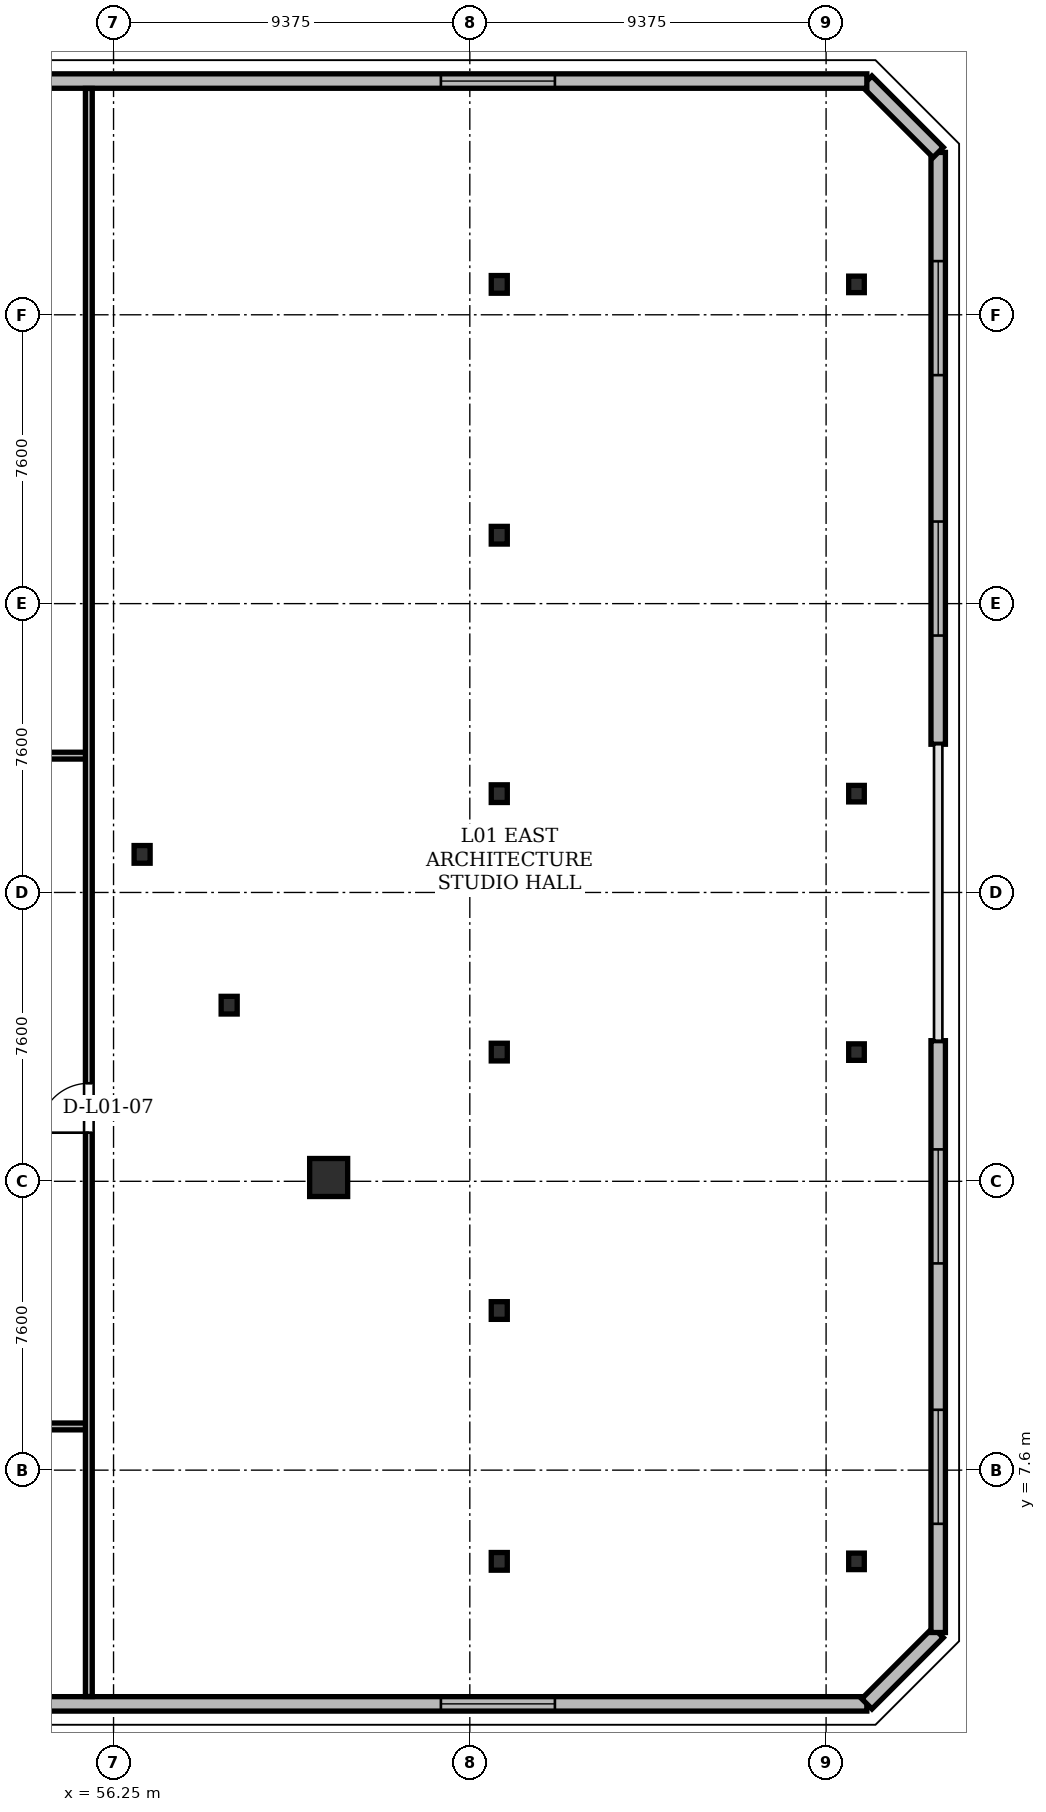
"""IFC4 building model, lengths in metres.
Left out: names, types, materials, properties, quantities, classifications, styles, units other than length and angle.
Written with IfcOpenShell. Run it as: python <this file> out.ifc"""

import sys

from ifc_helpers import new_model, si_unit, direction, frame, frame_2d, origin, origin_2d, place, context, subcontext, project, spatial, rectangle, hollow_rectangle, i_section, extrude, element, fill, save


model = new_model("IFC4")
c1 = context("Model", 3, precision=1e-05, world=origin(), true_north=direction((0.0, 1.0)))
c2 = subcontext(c1, "Body", "Model", "MODEL_VIEW")
j1 = project(units=[si_unit("LENGTHUNIT", "METRE"), si_unit("PLANEANGLEUNIT", "RADIAN")], contexts=[c1])
p1 = place(None, origin())
s1 = spatial("IfcSite", under=j1, at=p1, CompositionType="ELEMENT")
p2 = place(p1, origin())
s2 = spatial("IfcBuilding", under=s1, at=p2, CompositionType="ELEMENT")
p3 = place(p2, frame((0.0, 0.0, 5.4)))
s3 = spatial("IfcBuildingStorey", under=s2, at=p3, CompositionType="ELEMENT", Elevation=5.4)
p4 = place(p3, frame((61.91, 15.3, 0.005), z_axis=(0.0, 0.0, 1.0), x_axis=(1.0, 0.0, 0.0)))
e1 = element("IfcColumn", 1, at=p4, inside=s3, PredefinedType="COLUMN", context=c2, shape_type="SweptSolid", body=[
    extrude(hollow_rectangle(XDim=1.0, YDim=1.0, WallThickness=0.085, at=origin_2d()), origin(), (0.0, 0.0, 1.0), 4.491),
])
for number, where, z_axis, x_axis in (
    (2, (59.292, 19.834, 0.005), (0.0, 0.0, 1.0), (1.0, 0.0, 0.0)),
    (3, (57.002, 23.802, 0.005), (0.0, 0.0, 1.0), (1.0, 0.0, 0.0)),
):
    element("IfcColumn", number, at=place(p3, frame(where, z_axis=z_axis, x_axis=x_axis)), inside=s3, PredefinedType="COLUMN", context=c2, shape_type="SweptSolid", body=[
        extrude(i_section(OverallWidth=0.422, OverallDepth=0.465, WebThickness=0.045, FlangeThickness=0.072, at=origin_2d()), origin(), (0.0, 0.0, 1.0), 4.491),
    ])
for number, where, z_axis, x_axis in (
    (4, (66.4, 5.2, 0.0), (0.0, 0.0, 1.0), (1.0, 0.0, 0.0)),
    (5, (66.4, 11.8, 0.0), (0.0, 0.0, 1.0), (1.0, 0.0, 0.0)),
    (6, (66.4, 18.6, 0.0), (0.0, 0.0, 1.0), (1.0, 0.0, 0.0)),
    (7, (66.4, 25.4, 0.0), (0.0, 0.0, 1.0), (1.0, 0.0, 0.0)),
    (8, (66.4, 32.2, 0.0), (0.0, 0.0, 1.0), (1.0, 0.0, 0.0)),
    (9, (66.4, 38.8, 0.0), (0.0, 0.0, 1.0), (1.0, 0.0, 0.0)),
):
    element("IfcColumn", number, at=place(p3, frame(where, z_axis=z_axis, x_axis=x_axis)), inside=s3, PredefinedType="COLUMN", context=c2, shape_type="SweptSolid", body=[
        extrude(i_section(OverallWidth=0.422, OverallDepth=0.465, WebThickness=0.045, FlangeThickness=0.072, at=origin_2d()), origin(), (0.0, 0.0, 1.0), 4.5),
    ])
for number, where, z_axis, x_axis in (
    (10, (75.8, 5.2, 0.0), (0.0, 0.0, 1.0), (1.0, 0.0, 0.0)),
    (11, (75.8, 18.6, 0.0), (0.0, 0.0, 1.0), (1.0, 0.0, 0.0)),
    (12, (75.8, 25.4, 0.0), (0.0, 0.0, 1.0), (1.0, 0.0, 0.0)),
    (13, (75.8, 38.8, 0.0), (0.0, 0.0, 1.0), (1.0, 0.0, 0.0)),
):
    element("IfcColumn", number, at=place(p3, frame(where, z_axis=z_axis, x_axis=x_axis)), inside=s3, PredefinedType="COLUMN", context=c2, shape_type="SweptSolid", body=[
        extrude(i_section(OverallWidth=0.411, OverallDepth=0.434, WebThickness=0.036, FlangeThickness=0.057, at=origin_2d()), origin(), (0.0, 0.0, 1.0), 4.5),
    ])
p5 = place(p3, frame((41.4, 1.45, 0.0), z_axis=(0.0, 0.0, 1.0), x_axis=(1.0, 0.0, 0.0)))
e14 = element("IfcWall", 14, at=p5, inside=s3, PredefinedType="SOLIDWALL", context=c2, shape_type="SweptSolid", body=[
    extrude(rectangle(XDim=34.672, YDim=0.38, at=frame_2d((17.336, 0.0))), origin(), (0.0, 0.0, 1.0), 3.283),
])
p6 = place(p5, frame((8.208, 0.0, 0.85)))
e15 = element("IfcOpeningElement", 15, at=p6, cuts=e14, PredefinedType="OPENING", context=c2, shape_type="SweptSolid", body=[
    extrude(rectangle(XDim=3.0, YDim=2.25, at=frame_2d((1.5, 1.125))), frame((0.0, 0.19, 0.0), z_axis=(0.0, -1.0, 0.0), x_axis=(1.0, 0.0, 0.0)), (0.0, 0.0, 1.0), 0.38),
])
p7 = place(p5, frame((23.464, 0.0, 0.85)))
e16 = element("IfcOpeningElement", 16, at=p7, cuts=e14, PredefinedType="OPENING", context=c2, shape_type="SweptSolid", body=[
    extrude(rectangle(XDim=3.0, YDim=2.25, at=frame_2d((1.5, 1.125))), frame((0.0, 0.19, 0.0), z_axis=(0.0, -1.0, 0.0), x_axis=(1.0, 0.0, 0.0)), (0.0, 0.0, 1.0), 0.38),
])
p8 = place(p3, frame((76.072, 1.45, 0.0), z_axis=(0.0, 0.0, 1.0), x_axis=(0.707060812925, 0.70715274646, 0.0)))
e17 = element("IfcWall", 17, at=p8, inside=s3, PredefinedType="SOLIDWALL", context=c2, shape_type="SweptSolid", body=[
    extrude(rectangle(XDim=2.656, YDim=0.38, at=frame_2d((1.328, 0.0))), origin(), (0.0, 0.0, 1.0), 4.22),
])
p9 = place(p3, frame((77.95, 3.328, 0.0), z_axis=(0.0, 0.0, 1.0), x_axis=(0.0, 1.0, 0.0)))
e18 = element("IfcWall", 18, at=p9, inside=s3, PredefinedType="SOLIDWALL", context=c2, shape_type="SweptSolid", body=[
    extrude(rectangle(XDim=15.572, YDim=0.38, at=frame_2d((7.786, 0.0))), origin(), (0.0, 0.0, 1.0), 4.22),
])
p10 = place(p9, frame((2.86, 0.0, 0.85)))
e19 = element("IfcOpeningElement", 19, at=p10, cuts=e18, PredefinedType="OPENING", context=c2, shape_type="SweptSolid", body=[
    extrude(rectangle(XDim=3.0, YDim=2.25, at=frame_2d((1.5, 1.125))), frame((0.0, 0.19, 0.0), z_axis=(0.0, -1.0, 0.0), x_axis=(1.0, 0.0, 0.0)), (0.0, 0.0, 1.0), 0.38),
])
p11 = place(p9, frame((9.712, 0.0, 0.85)))
e20 = element("IfcOpeningElement", 20, at=p11, cuts=e18, PredefinedType="OPENING", context=c2, shape_type="SweptSolid", body=[
    extrude(rectangle(XDim=3.0, YDim=2.25, at=frame_2d((1.5, 1.125))), frame((0.0, 0.19, 0.0), z_axis=(0.0, -1.0, 0.0), x_axis=(1.0, 0.0, 0.0)), (0.0, 0.0, 1.0), 0.38),
])
p12 = place(p3, frame((77.95, 26.7, 0.0), z_axis=(0.0, 0.0, 1.0), x_axis=(0.0, 1.0, 0.0)))
e21 = element("IfcWall", 21, at=p12, inside=s3, PredefinedType="SOLIDWALL", context=c2, shape_type="SweptSolid", body=[
    extrude(rectangle(XDim=15.572, YDim=0.38, at=frame_2d((7.786, 0.0))), origin(), (0.0, 0.0, 1.0), 4.22),
])
p13 = place(p12, frame((2.86, 0.0, 0.85)))
e22 = element("IfcOpeningElement", 22, at=p13, cuts=e21, PredefinedType="OPENING", context=c2, shape_type="SweptSolid", body=[
    extrude(rectangle(XDim=3.0, YDim=2.25, at=frame_2d((1.5, 1.125))), frame((0.0, 0.19, 0.0), z_axis=(0.0, -1.0, 0.0), x_axis=(1.0, 0.0, 0.0)), (0.0, 0.0, 1.0), 0.38),
])
p14 = place(p12, frame((9.712, 0.0, 0.85)))
e23 = element("IfcOpeningElement", 23, at=p14, cuts=e21, PredefinedType="OPENING", context=c2, shape_type="SweptSolid", body=[
    extrude(rectangle(XDim=3.0, YDim=2.25, at=frame_2d((1.5, 1.125))), frame((0.0, 0.19, 0.0), z_axis=(0.0, -1.0, 0.0), x_axis=(1.0, 0.0, 0.0)), (0.0, 0.0, 1.0), 0.38),
])
p15 = place(p3, frame((77.95, 42.272, 0.0), z_axis=(0.0, 0.0, 1.0), x_axis=(-0.707106781187, 0.707106781187, 0.0)))
e24 = element("IfcWall", 24, at=p15, inside=s3, PredefinedType="SOLIDWALL", context=c2, shape_type="SweptSolid", body=[
    extrude(rectangle(XDim=2.656, YDim=0.38, at=frame_2d((1.328, 0.0))), origin(), (0.0, 0.0, 1.0), 4.22),
])
p16 = place(p3, frame((76.072, 44.15, 0.0), z_axis=(0.0, 0.0, 1.0), x_axis=(-1.0, 0.0, 0.0)))
e25 = element("IfcWall", 25, at=p16, inside=s3, PredefinedType="SOLIDWALL", context=c2, shape_type="SweptSolid", body=[
    extrude(rectangle(XDim=34.672, YDim=0.38, at=frame_2d((17.336, 0.0))), origin(), (0.0, 0.0, 1.0), 4.22),
])
p17 = place(p16, frame((8.208, 0.0, 0.85)))
e26 = element("IfcOpeningElement", 26, at=p17, cuts=e25, PredefinedType="OPENING", context=c2, shape_type="SweptSolid", body=[
    extrude(rectangle(XDim=3.0, YDim=2.25, at=frame_2d((1.5, 1.125))), frame((0.0, 0.19, 0.0), z_axis=(0.0, -1.0, 0.0), x_axis=(1.0, 0.0, 0.0)), (0.0, 0.0, 1.0), 0.38),
])
p18 = place(p16, frame((23.464, 0.0, 0.85)))
e27 = element("IfcOpeningElement", 27, at=p18, cuts=e25, PredefinedType="OPENING", context=c2, shape_type="SweptSolid", body=[
    extrude(rectangle(XDim=3.0, YDim=2.25, at=frame_2d((1.5, 1.125))), frame((0.0, 0.19, 0.0), z_axis=(0.0, -1.0, 0.0), x_axis=(1.0, 0.0, 0.0)), (0.0, 0.0, 1.0), 0.38),
])
p19 = place(p3, frame((14.03, 8.75, 0.0), z_axis=(0.0, 0.0, 1.0), x_axis=(1.0, 0.0, 0.0)))
e28 = element("IfcWall", 28, at=p19, inside=s3, PredefinedType="PARTITIONING", context=c2, shape_type="SweptSolid", body=[
    extrude(rectangle(XDim=41.57, YDim=0.18, at=frame_2d((20.785, 0.0))), origin(), (0.0, 0.0, 1.0), 3.283),
])
p20 = place(p19, frame((11.336, 0.0, 0.0)))
e29 = element("IfcOpeningElement", 29, at=p20, cuts=e28, PredefinedType="OPENING", context=c2, shape_type="SweptSolid", body=[
    extrude(rectangle(XDim=1.3, YDim=2.2, at=frame_2d((0.65, 1.1))), frame((0.0, 0.09, 0.0), z_axis=(0.0, -1.0, 0.0), x_axis=(1.0, 0.0, 0.0)), (0.0, 0.0, 1.0), 0.18),
])
p21 = place(p19, frame((32.094, 0.0, 0.0)))
e30 = element("IfcOpeningElement", 30, at=p21, cuts=e28, PredefinedType="OPENING", context=c2, shape_type="SweptSolid", body=[
    extrude(rectangle(XDim=1.3, YDim=2.2, at=frame_2d((0.65, 1.1))), frame((0.0, 0.09, 0.0), z_axis=(0.0, -1.0, 0.0), x_axis=(1.0, 0.0, 0.0)), (0.0, 0.0, 1.0), 0.18),
])
p22 = place(p3, frame((27.05, 26.4, 0.0), z_axis=(0.0, 0.0, 1.0), x_axis=(1.0, 0.0, 0.0)))
e31 = element("IfcWall", 31, at=p22, inside=s3, PredefinedType="PARTITIONING", context=c2, shape_type="SweptSolid", body=[
    extrude(rectangle(XDim=28.55, YDim=0.18, at=frame_2d((14.275, 0.0))), origin(), (0.0, 0.0, 1.0), 3.283),
])
p23 = place(p22, frame((7.425, 0.0, 0.0)))
e32 = element("IfcOpeningElement", 32, at=p23, cuts=e31, PredefinedType="OPENING", context=c2, shape_type="SweptSolid", body=[
    extrude(rectangle(XDim=1.3, YDim=2.2, at=frame_2d((0.65, 1.1))), frame((0.0, 0.09, 0.0), z_axis=(0.0, -1.0, 0.0), x_axis=(1.0, 0.0, 0.0)), (0.0, 0.0, 1.0), 0.18),
])
p24 = place(p22, frame((18.437, 0.0, 0.0)))
e33 = element("IfcOpeningElement", 33, at=p24, cuts=e31, PredefinedType="OPENING", context=c2, shape_type="SweptSolid", body=[
    extrude(rectangle(XDim=0.88, YDim=2.08, at=frame_2d((0.44, 1.04))), frame((0.0, 0.09, 0.0), z_axis=(0.0, -1.0, 0.0), x_axis=(1.0, 0.0, 0.0)), (0.0, 0.0, 1.0), 0.18),
])
p25 = place(p22, frame((23.736, 0.0, 0.0)))
e34 = element("IfcOpeningElement", 34, at=p25, cuts=e31, PredefinedType="OPENING", context=c2, shape_type="SweptSolid", body=[
    extrude(rectangle(XDim=0.88, YDim=2.08, at=frame_2d((0.44, 1.04))), frame((0.0, 0.09, 0.0), z_axis=(0.0, -1.0, 0.0), x_axis=(1.0, 0.0, 0.0)), (0.0, 0.0, 1.0), 0.18),
])
p26 = place(p3, frame((55.6, 1.644, 0.0), z_axis=(0.0, 0.0, 1.0), x_axis=(0.0, 1.0, 0.0)))
e35 = element("IfcWall", 35, at=p26, inside=s3, PredefinedType="PARTITIONING", context=c2, shape_type="SweptSolid", body=[
    extrude(rectangle(XDim=42.312, YDim=0.18, at=frame_2d((21.156, 0.0))), origin(), (0.0, 0.0, 1.0), 3.01),
])
p27 = place(p26, frame((14.835, 0.0, 0.0)))
e36 = element("IfcOpeningElement", 36, at=p27, cuts=e35, PredefinedType="OPENING", context=c2, shape_type="SweptSolid", body=[
    extrude(rectangle(XDim=1.3, YDim=2.2, at=frame_2d((0.65, 1.1))), frame((0.0, 0.09, 0.0), z_axis=(0.0, -1.0, 0.0), x_axis=(1.0, 0.0, 0.0)), (0.0, 0.0, 1.0), 0.18),
])
p28 = place(p7, origin())
e37 = element("IfcWindow", 37, at=p28, inside=s3, PartitioningType="SINGLE_PANEL", PredefinedType="WINDOW", context=c2, shape_type="SweptSolid", body=[
    extrude(rectangle(XDim=3.0, YDim=2.25, at=frame_2d((1.5, 1.125))), frame((0.0, 0.03, 0.0), z_axis=(0.0, -1.0, 0.0), x_axis=(1.0, 0.0, 0.0)), (0.0, 0.0, 1.0), 0.06),
])
fill(e16, e37)
p29 = place(p10, origin())
e38 = element("IfcWindow", 38, at=p29, inside=s3, PartitioningType="SINGLE_PANEL", PredefinedType="WINDOW", context=c2, shape_type="SweptSolid", body=[
    extrude(rectangle(XDim=3.0, YDim=2.25, at=frame_2d((1.5, 1.125))), frame((0.0, 0.03, 0.0), z_axis=(0.0, -1.0, 0.0), x_axis=(1.0, 0.0, 0.0)), (0.0, 0.0, 1.0), 0.06),
])
fill(e19, e38)
p30 = place(p11, origin())
e39 = element("IfcWindow", 39, at=p30, inside=s3, PartitioningType="SINGLE_PANEL", PredefinedType="WINDOW", context=c2, shape_type="SweptSolid", body=[
    extrude(rectangle(XDim=3.0, YDim=2.25, at=frame_2d((1.5, 1.125))), frame((0.0, 0.03, 0.0), z_axis=(0.0, -1.0, 0.0), x_axis=(1.0, 0.0, 0.0)), (0.0, 0.0, 1.0), 0.06),
])
fill(e20, e39)
p31 = place(p13, origin())
e40 = element("IfcWindow", 40, at=p31, inside=s3, PartitioningType="SINGLE_PANEL", PredefinedType="WINDOW", context=c2, shape_type="SweptSolid", body=[
    extrude(rectangle(XDim=3.0, YDim=2.25, at=frame_2d((1.5, 1.125))), frame((0.0, 0.03, 0.0), z_axis=(0.0, -1.0, 0.0), x_axis=(1.0, 0.0, 0.0)), (0.0, 0.0, 1.0), 0.06),
])
fill(e22, e40)
p32 = place(p14, origin())
e41 = element("IfcWindow", 41, at=p32, inside=s3, PartitioningType="SINGLE_PANEL", PredefinedType="WINDOW", context=c2, shape_type="SweptSolid", body=[
    extrude(rectangle(XDim=3.0, YDim=2.25, at=frame_2d((1.5, 1.125))), frame((0.0, 0.03, 0.0), z_axis=(0.0, -1.0, 0.0), x_axis=(1.0, 0.0, 0.0)), (0.0, 0.0, 1.0), 0.06),
])
fill(e23, e41)
p33 = place(p17, origin())
e42 = element("IfcWindow", 42, at=p33, inside=s3, PartitioningType="SINGLE_PANEL", PredefinedType="WINDOW", context=c2, shape_type="SweptSolid", body=[
    extrude(rectangle(XDim=3.0, YDim=2.25, at=frame_2d((1.5, 1.125))), frame((0.0, 0.03, 0.0), z_axis=(0.0, -1.0, 0.0), x_axis=(1.0, 0.0, 0.0)), (0.0, 0.0, 1.0), 0.06),
])
fill(e26, e42)
p34 = place(p27, origin())
e43 = element("IfcDoor", 43, at=p34, inside=s3, OperationType="SINGLE_SWING_LEFT", PredefinedType="DOOR", context=c2, shape_type="SweptSolid", body=[
    extrude(rectangle(XDim=1.3, YDim=2.2, at=frame_2d((0.65, 1.1))), frame((0.0, 0.025, 0.0), z_axis=(0.0, -1.0, 0.0), x_axis=(1.0, 0.0, 0.0)), (0.0, 0.0, 1.0), 0.05),
])
fill(e36, e43)
save(model, sys.argv[1])
